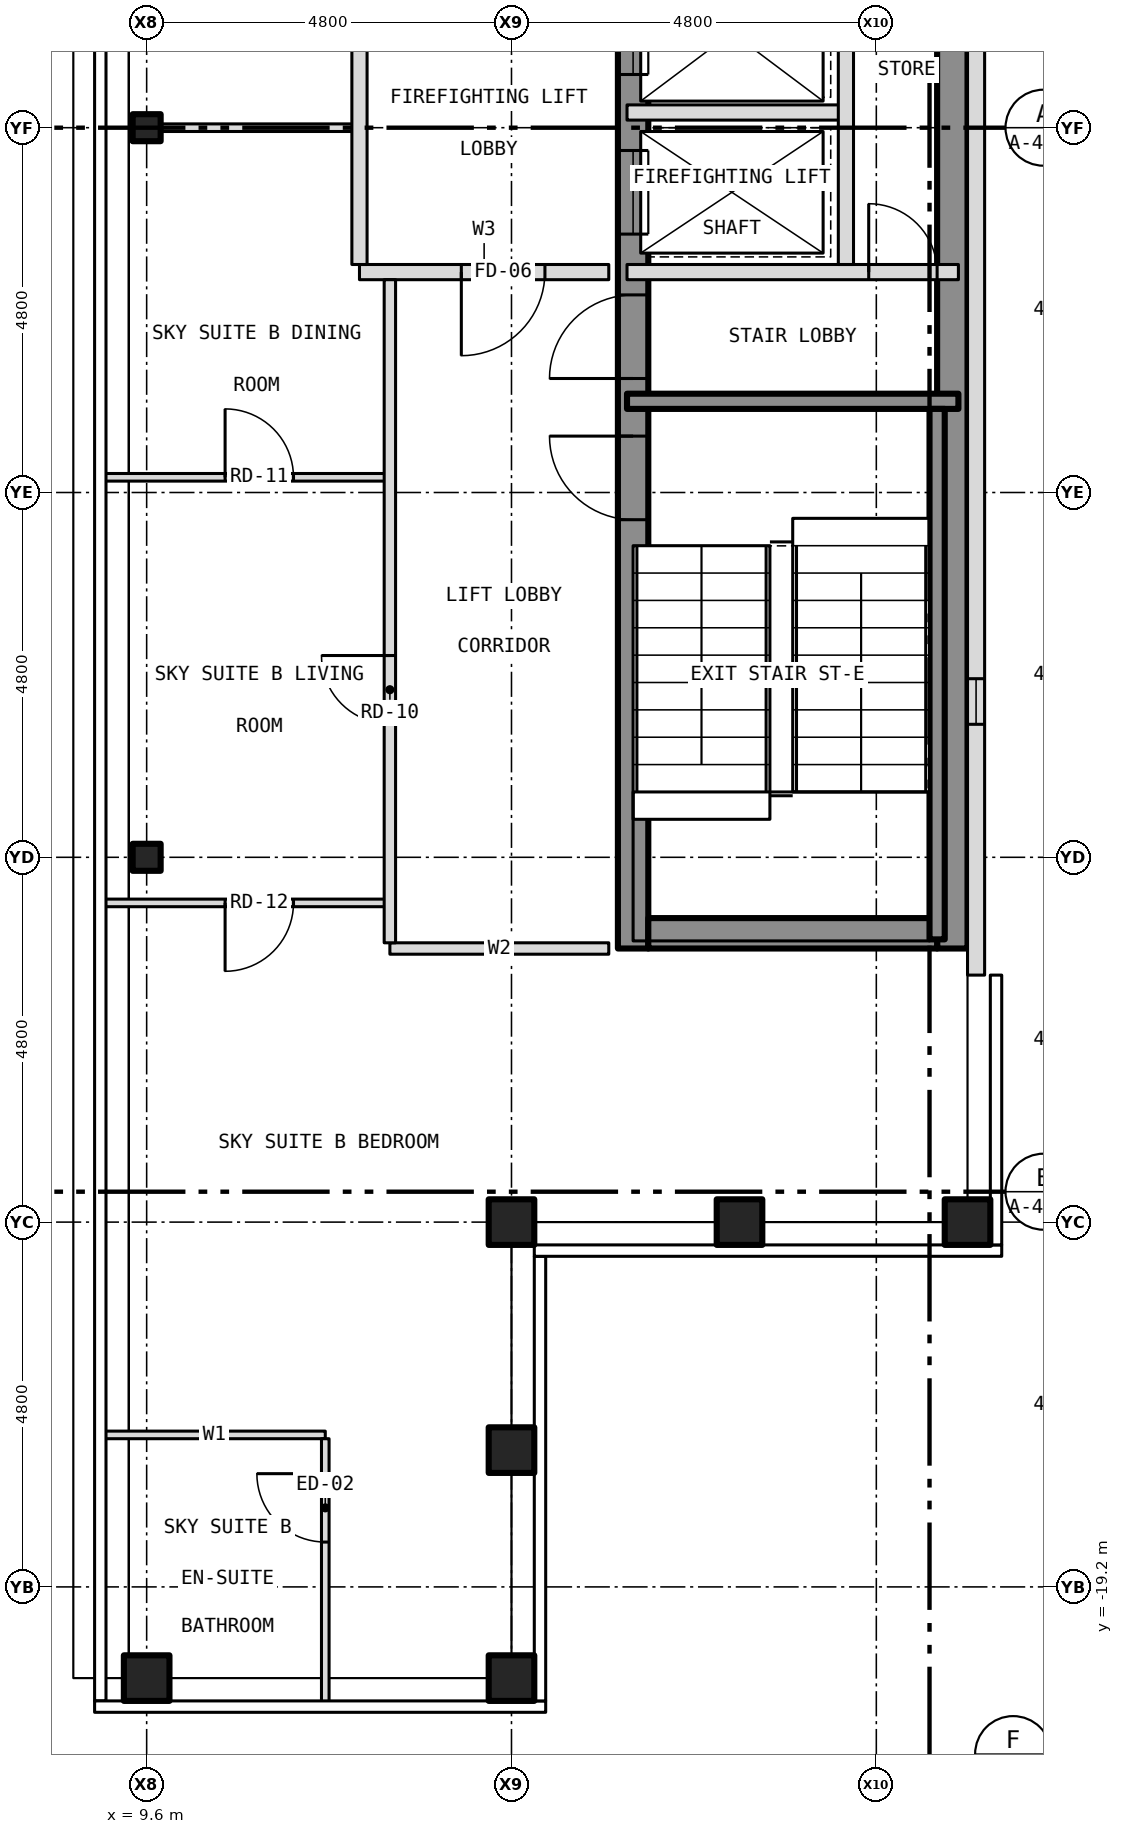
"""IFC4 building model, lengths in metres.
Left out: names, types, materials, properties, quantities, classifications, styles, units other than length and angle.
Written with IfcOpenShell. Run it as: python <this file> out.ifc"""

import sys

from ifc_helpers import new_model, si_unit, direction, frame, frame_2d, origin, origin_2d, place, context, subcontext, project, spatial, rectangle, hollow_rectangle, i_section, extrude, element, fill, save


model = new_model("IFC4")
c1 = context("Model", 3, precision=1e-05, world=origin(), true_north=direction((0.0, 1.0)))
c2 = subcontext(c1, "Body", "Model", "MODEL_VIEW")
j1 = project(units=[si_unit("LENGTHUNIT", "METRE"), si_unit("PLANEANGLEUNIT", "RADIAN")], contexts=[c1])
p1 = place(None, origin())
s1 = spatial("IfcSite", under=j1, at=p1, CompositionType="ELEMENT")
p2 = place(p1, origin())
s2 = spatial("IfcBuilding", under=s1, at=p2, CompositionType="ELEMENT")
p3 = place(p2, frame((0.0, 0.0, 276.0)))
s3 = spatial("IfcBuildingStorey", under=s2, at=p3, CompositionType="ELEMENT", Elevation=276.0)
for number, where, z_axis, x_axis in (
    (1, (9.6, -20.4, -0.15), (0.0, 0.0, 1.0), (1.0, 0.0, 0.0)),
    (2, (14.4, -20.4, -0.15), (0.0, 0.0, 1.0), (1.0, 0.0, 0.0)),
    (3, (20.4, -14.4, -0.15), (0.0, 0.0, 1.0), (1.0, 0.0, 0.0)),
    (4, (14.4, -14.4, -0.15), (0.0, 0.0, 1.0), (1.0, 0.0, 0.0)),
    (5, (14.4, -17.4, -0.15), (0.0, 0.0, 1.0), (1.0, 0.0, 0.0)),
    (6, (17.4, -14.4, -0.15), (0.0, 0.0, 1.0), (1.0, 0.0, 0.0)),
):
    element("IfcColumn", number, at=place(p3, frame(where, z_axis=z_axis, x_axis=x_axis)), inside=s3, PredefinedType="COLUMN", context=c2, shape_type="SweptSolid", body=[
        extrude(hollow_rectangle(XDim=0.6, YDim=0.6, WallThickness=0.03, at=origin_2d()), origin(), (0.0, 0.0, 1.0), 3.5),
    ])
for number, where, z_axis, x_axis in (
    (7, (9.6, -9.6, -0.15), (0.0, 0.0, 1.0), (1.0, 0.0, 0.0)),
    (8, (9.6, 0.0, -0.15), (0.0, 0.0, 1.0), (1.0, 0.0, 0.0)),
):
    element("IfcColumn", number, at=place(p3, frame(where, z_axis=z_axis, x_axis=x_axis)), inside=s3, PredefinedType="COLUMN", context=c2, shape_type="SweptSolid", body=[
        extrude(i_section(OverallWidth=0.368, OverallDepth=0.356, WebThickness=0.011, FlangeThickness=0.018, at=origin_2d()), origin(), (0.0, 0.0, 1.0), 3.5),
    ])
p4 = place(p3, frame((16.0, -10.8, 0.0), z_axis=(0.0, 0.0, 1.0), x_axis=(0.0, 1.0, 0.0)))
e9 = element("IfcWall", 9, at=p4, inside=s3, PredefinedType="SHEAR", context=c2, shape_type="SweptSolid", body=[
    extrude(rectangle(XDim=21.6, YDim=0.4, at=frame_2d((10.8, 0.0))), origin(), (0.0, 0.0, 1.0), 3.25),
])
p5 = place(p4, frame((9.4, 0.0, 0.0)))
e10 = element("IfcOpeningElement", 10, at=p5, cuts=e9, PredefinedType="OPENING", context=c2, shape_type="SweptSolid", body=[
    extrude(rectangle(XDim=1.1, YDim=2.1, at=frame_2d((0.55, 1.05))), frame((0.0, 0.212, 0.0), z_axis=(0.0, -1.0, 0.0), x_axis=(1.0, 0.0, 0.0)), (0.0, 0.0, 1.0), 0.424),
])
p6 = place(p4, frame((11.5, 0.0, 0.0)))
e11 = element("IfcOpeningElement", 11, at=p6, cuts=e9, PredefinedType="OPENING", context=c2, shape_type="SweptSolid", body=[
    extrude(rectangle(XDim=1.1, YDim=2.1, at=frame_2d((0.55, 1.05))), frame((0.0, 0.212, 0.0), z_axis=(0.0, -1.0, 0.0), x_axis=(1.0, 0.0, 0.0)), (0.0, 0.0, 1.0), 0.424),
])
p7 = place(p4, frame((13.6, 0.0, 0.0)))
e12 = element("IfcOpeningElement", 12, at=p7, cuts=e9, PredefinedType="OPENING", context=c2, shape_type="SweptSolid", body=[
    extrude(rectangle(XDim=1.1, YDim=2.1, at=frame_2d((0.55, 1.05))), frame((0.0, 0.212, 0.0), z_axis=(0.0, -1.0, 0.0), x_axis=(1.0, 0.0, 0.0)), (0.0, 0.0, 1.0), 0.424),
])
p8 = place(p4, frame((15.7, 0.0, 0.0)))
e13 = element("IfcOpeningElement", 13, at=p8, cuts=e9, PredefinedType="OPENING", context=c2, shape_type="SweptSolid", body=[
    extrude(rectangle(XDim=1.1, YDim=2.1, at=frame_2d((0.55, 1.05))), frame((0.0, 0.212, 0.0), z_axis=(0.0, -1.0, 0.0), x_axis=(1.0, 0.0, 0.0)), (0.0, 0.0, 1.0), 0.424),
])
p9 = place(p4, frame((17.8, 0.0, 0.0)))
e14 = element("IfcOpeningElement", 14, at=p9, cuts=e9, PredefinedType="OPENING", context=c2, shape_type="SweptSolid", body=[
    extrude(rectangle(XDim=1.1, YDim=2.1, at=frame_2d((0.55, 1.05))), frame((0.0, 0.212, 0.0), z_axis=(0.0, -1.0, 0.0), x_axis=(1.0, 0.0, 0.0)), (0.0, 0.0, 1.0), 0.424),
])
p10 = place(p4, frame((5.642, 0.0, 0.0)))
e15 = element("IfcOpeningElement", 15, at=p10, cuts=e9, PredefinedType="OPENING", context=c2, shape_type="SweptSolid", body=[
    extrude(rectangle(XDim=1.1, YDim=2.1, at=frame_2d((0.55, 1.05))), frame((0.0, 0.212, 0.0), z_axis=(0.0, -1.0, 0.0), x_axis=(1.0, 0.0, 0.0)), (0.0, 0.0, 1.0), 0.424),
])
p11 = place(p4, frame((7.5, 0.0, 0.0)))
e16 = element("IfcOpeningElement", 16, at=p11, cuts=e9, PredefinedType="OPENING", context=c2, shape_type="SweptSolid", body=[
    extrude(rectangle(XDim=1.1, YDim=2.1, at=frame_2d((0.55, 1.05))), frame((0.0, 0.212, 0.0), z_axis=(0.0, -1.0, 0.0), x_axis=(1.0, 0.0, 0.0)), (0.0, 0.0, 1.0), 0.424),
])
p12 = place(p4, frame((20.0, 0.0, 0.0)))
e17 = element("IfcOpeningElement", 17, at=p12, cuts=e9, PredefinedType="OPENING", context=c2, shape_type="SweptSolid", body=[
    extrude(rectangle(XDim=0.9, YDim=2.1, at=frame_2d((0.45, 1.05))), frame((0.0, 0.212, 0.0), z_axis=(0.0, -1.0, 0.0), x_axis=(1.0, 0.0, 0.0)), (0.0, 0.0, 1.0), 0.424),
])
p13 = place(p3, frame((20.2, -10.8, 0.0), z_axis=(0.0, 0.0, 1.0), x_axis=(0.0, 1.0, 0.0)))
e18 = element("IfcWall", 18, at=p13, inside=s3, PredefinedType="SHEAR", context=c2, shape_type="SweptSolid", body=[
    extrude(rectangle(XDim=21.6, YDim=0.4, at=frame_2d((10.8, 0.0))), origin(), (0.0, 0.0, 1.0), 3.25),
])
p14 = place(p3, frame((16.2, -10.6, 0.0), z_axis=(0.0, 0.0, 1.0), x_axis=(1.0, 0.0, 0.0)))
e19 = element("IfcWall", 19, at=p14, inside=s3, PredefinedType="SHEAR", context=c2, shape_type="SweptSolid", body=[
    extrude(rectangle(XDim=3.8, YDim=0.4, at=frame_2d((1.9, 0.0))), origin(), (0.0, 0.0, 1.0), 3.25),
])
p15 = place(p3, frame((20.512, -11.15, 0.0), z_axis=(0.0, 0.0, 1.0), x_axis=(0.0, 1.0, 0.0)))
e20 = element("IfcWall", 20, at=p15, inside=s3, PredefinedType="SOLIDWALL", context=c2, shape_type="SweptSolid", body=[
    extrude(rectangle(XDim=22.3, YDim=0.225, at=frame_2d((11.15, 0.0))), origin(), (0.0, 0.0, 1.0), 3.5),
])
p16 = place(p15, frame((3.3, 0.0, 1.0)))
e21 = element("IfcOpeningElement", 21, at=p16, cuts=e20, PredefinedType="OPENING", context=c2, shape_type="SweptSolid", body=[
    extrude(rectangle(XDim=0.6, YDim=1.5, at=frame_2d((0.3, 0.75))), frame((0.0, 0.125, 0.0), z_axis=(0.0, -1.0, 0.0), x_axis=(1.0, 0.0, 0.0)), (0.0, 0.0, 1.0), 0.249),
])
p17 = place(p3, frame((9.035, -17.2, 0.0), z_axis=(0.0, 0.0, 1.0), x_axis=(1.0, 0.0, 0.0)))
e22 = element("IfcWall", 22, at=p17, inside=s3, PredefinedType="PARTITIONING", context=c2, shape_type="SweptSolid", body=[
    extrude(rectangle(XDim=2.915, YDim=0.1, at=frame_2d((1.458, 0.0))), origin(), (0.0, 0.0, 1.0), 3.35),
])
p18 = place(p3, frame((12.8, -10.8, 0.0), z_axis=(0.0, 0.0, 1.0), x_axis=(1.0, 0.0, 0.0)))
e23 = element("IfcWall", 23, at=p18, inside=s3, PredefinedType="PARTITIONING", context=c2, shape_type="SweptSolid", body=[
    extrude(rectangle(XDim=2.88, YDim=0.15, at=frame_2d((1.44, 0.0))), origin(), (0.0, 0.0, 1.0), 3.35),
])
p19 = place(p3, frame((9.035, -10.2, 0.0), z_axis=(0.0, 0.0, 1.0), x_axis=(1.0, 0.0, 0.0)))
e24 = element("IfcWall", 24, at=p19, inside=s3, PredefinedType="PARTITIONING", context=c2, shape_type="SweptSolid", body=[
    extrude(rectangle(XDim=3.765, YDim=0.1, at=frame_2d((1.883, 0.0))), origin(), (0.0, 0.0, 1.0), 3.35),
])
p20 = place(p19, frame((1.597, 0.0, 0.0)))
e25 = element("IfcOpeningElement", 25, at=p20, cuts=e24, PredefinedType="OPENING", context=c2, shape_type="SweptSolid", body=[
    extrude(rectangle(XDim=0.9, YDim=2.1, at=frame_2d((0.45, 1.05))), frame((0.0, 0.062, 0.0), z_axis=(0.0, -1.0, 0.0), x_axis=(1.0, 0.0, 0.0)), (0.0, 0.0, 1.0), 0.124),
])
p21 = place(p3, frame((9.035, -4.6, 0.0), z_axis=(0.0, 0.0, 1.0), x_axis=(1.0, 0.0, 0.0)))
e26 = element("IfcWall", 26, at=p21, inside=s3, PredefinedType="PARTITIONING", context=c2, shape_type="SweptSolid", body=[
    extrude(rectangle(XDim=3.765, YDim=0.1, at=frame_2d((1.883, 0.0))), origin(), (0.0, 0.0, 1.0), 3.35),
])
p22 = place(p21, frame((1.597, 0.0, 0.0)))
e27 = element("IfcOpeningElement", 27, at=p22, cuts=e26, PredefinedType="OPENING", context=c2, shape_type="SweptSolid", body=[
    extrude(rectangle(XDim=0.9, YDim=2.1, at=frame_2d((0.45, 1.05))), frame((0.0, 0.062, 0.0), z_axis=(0.0, -1.0, 0.0), x_axis=(1.0, 0.0, 0.0)), (0.0, 0.0, 1.0), 0.124),
])
p23 = place(p3, frame((15.92, -3.6, 0.0), z_axis=(0.0, 0.0, 1.0), x_axis=(1.0, 0.0, 0.0)))
e28 = element("IfcWall", 28, at=p23, inside=s3, PredefinedType="SHEAR", context=c2, shape_type="SweptSolid", body=[
    extrude(rectangle(XDim=4.36, YDim=0.2, at=frame_2d((2.18, 0.0))), origin(), (0.0, 0.0, 1.0), 3.25),
])
p24 = place(p3, frame((12.4, -1.9, 0.0), z_axis=(0.0, 0.0, 1.0), x_axis=(1.0, 0.0, 0.0)))
e29 = element("IfcWall", 29, at=p24, inside=s3, PredefinedType="PARTITIONING", context=c2, shape_type="SweptSolid", body=[
    extrude(rectangle(XDim=3.28, YDim=0.2, at=frame_2d((1.64, 0.0))), origin(), (0.0, 0.0, 1.0), 3.35),
])
p25 = place(p24, frame((1.34, 0.0, 0.0)))
e30 = element("IfcOpeningElement", 30, at=p25, cuts=e29, PredefinedType="OPENING", context=c2, shape_type="SweptSolid", body=[
    extrude(rectangle(XDim=1.1, YDim=2.1, at=frame_2d((0.55, 1.05))), frame((0.0, 0.112, 0.0), z_axis=(0.0, -1.0, 0.0), x_axis=(1.0, 0.0, 0.0)), (0.0, 0.0, 1.0), 0.224),
])
p26 = place(p3, frame((15.92, -1.9, 0.0), z_axis=(0.0, 0.0, 1.0), x_axis=(1.0, 0.0, 0.0)))
e31 = element("IfcWall", 31, at=p26, inside=s3, PredefinedType="PARTITIONING", context=c2, shape_type="SweptSolid", body=[
    extrude(rectangle(XDim=4.36, YDim=0.2, at=frame_2d((2.18, 0.0))), origin(), (0.0, 0.0, 1.0), 3.25),
])
p27 = place(p26, frame((3.18, 0.0, 0.0)))
e32 = element("IfcOpeningElement", 32, at=p27, cuts=e31, PredefinedType="OPENING", context=c2, shape_type="SweptSolid", body=[
    extrude(rectangle(XDim=0.9, YDim=2.1, at=frame_2d((0.45, 1.05))), frame((0.0, 0.112, 0.0), z_axis=(0.0, -1.0, 0.0), x_axis=(1.0, 0.0, 0.0)), (0.0, 0.0, 1.0), 0.224),
])
p28 = place(p3, frame((9.485, 0.0, 0.0), z_axis=(0.0, 0.0, 1.0), x_axis=(1.0, 0.0, 0.0)))
e33 = element("IfcWall", 33, at=p28, inside=s3, PredefinedType="PARTITIONING", context=c2, shape_type="SweptSolid", body=[
    extrude(rectangle(XDim=2.915, YDim=0.1, at=frame_2d((1.458, 0.0))), origin(), (0.0, 0.0, 1.0), 2.728),
])
p29 = place(p3, frame((15.92, 0.2, 0.0), z_axis=(0.0, 0.0, 1.0), x_axis=(1.0, 0.0, 0.0)))
e34 = element("IfcWall", 34, at=p29, inside=s3, PredefinedType="PARTITIONING", context=c2, shape_type="SweptSolid", body=[
    extrude(rectangle(XDim=2.88, YDim=0.2, at=frame_2d((1.44, 0.0))), origin(), (0.0, 0.0, 1.0), 3.25),
])
p30 = place(p3, frame((11.95, -20.73, 0.0), z_axis=(0.0, 0.0, 1.0), x_axis=(0.0, 1.0, 0.0)))
e35 = element("IfcWall", 35, at=p30, inside=s3, PredefinedType="PARTITIONING", context=c2, shape_type="SweptSolid", body=[
    extrude(rectangle(XDim=3.48, YDim=0.1, at=frame_2d((1.74, 0.0))), origin(), (0.0, 0.0, 1.0), 3.35),
])
p31 = place(p30, frame((2.12, 0.0, 0.0)))
e36 = element("IfcOpeningElement", 36, at=p31, cuts=e35, PredefinedType="OPENING", context=c2, shape_type="SweptSolid", body=[
    extrude(rectangle(XDim=0.9, YDim=2.1, at=frame_2d((0.45, 1.05))), frame((0.0, 0.062, 0.0), z_axis=(0.0, -1.0, 0.0), x_axis=(1.0, 0.0, 0.0)), (0.0, 0.0, 1.0), 0.124),
])
p32 = place(p3, frame((12.4, -1.8, 0.0), z_axis=(0.0, 0.0, 1.0), x_axis=(0.0, 1.0, 0.0)))
e37 = element("IfcWall", 37, at=p32, inside=s3, PredefinedType="PARTITIONING", context=c2, shape_type="SweptSolid", body=[
    extrude(rectangle(XDim=4.0, YDim=0.2, at=frame_2d((2.0, 0.0))), origin(), (0.0, 0.0, 1.0), 3.35),
])
p33 = place(p3, frame((12.8, -10.725, 0.0), z_axis=(0.0, 0.0, 1.0), x_axis=(0.0, 1.0, 0.0)))
e38 = element("IfcWall", 38, at=p33, inside=s3, PredefinedType="PARTITIONING", context=c2, shape_type="SweptSolid", body=[
    extrude(rectangle(XDim=8.725, YDim=0.15, at=frame_2d((4.363, 0.0))), origin(), (0.0, 0.0, 1.0), 3.35),
])
p34 = place(p33, frame((2.88, 0.0, 0.0)))
e39 = element("IfcOpeningElement", 39, at=p34, cuts=e38, PredefinedType="OPENING", context=c2, shape_type="SweptSolid", body=[
    extrude(rectangle(XDim=0.9, YDim=2.1, at=frame_2d((0.45, 1.05))), frame((0.0, 0.087, 0.0), z_axis=(0.0, -1.0, 0.0), x_axis=(1.0, 0.0, 0.0)), (0.0, 0.0, 1.0), 0.174),
])
p35 = place(p3, frame((18.8, -1.8, 0.0), z_axis=(0.0, 0.0, 1.0), x_axis=(0.0, 1.0, 0.0)))
e40 = element("IfcWall", 40, at=p35, inside=s3, PredefinedType="PARTITIONING", context=c2, shape_type="SweptSolid", body=[
    extrude(rectangle(XDim=6.1, YDim=0.2, at=frame_2d((3.05, 0.0))), origin(), (0.0, 0.0, 1.0), 3.25),
])
p36 = place(p3, frame((20.0, -10.68, 0.0), z_axis=(0.0, 0.0, 1.0), x_axis=(0.0, 1.0, 0.0)))
e41 = element("IfcWall", 41, at=p36, inside=s3, PredefinedType="SHEAR", context=c2, shape_type="SweptSolid", body=[
    extrude(rectangle(XDim=6.98, YDim=0.2, at=frame_2d((3.49, 0.0))), origin(), (0.0, 0.0, 1.0), 3.25),
])
p37 = place(p16, origin())
e42 = element("IfcWindow", 42, at=p37, inside=s3, PartitioningType="SINGLE_PANEL", PredefinedType="WINDOW", context=c2, shape_type="SweptSolid", body=[
    extrude(rectangle(XDim=0.6, YDim=1.5, at=frame_2d((0.3, 0.75))), frame((0.0, -0.022, 0.0), z_axis=(0.0, -1.0, 0.0), x_axis=(1.0, 0.0, 0.0)), (0.0, 0.0, 1.0), 0.06),
])
fill(e21, e42)
p38 = place(p5, origin())
e43 = element("IfcDoor", 43, at=p38, inside=s3, OperationType="SLIDING_TO_LEFT", PredefinedType="DOOR", context=c2, shape_type="SweptSolid", body=[
    extrude(rectangle(XDim=1.1, YDim=2.1, at=frame_2d((0.55, 1.05))), frame((0.0, 0.025, 0.0), z_axis=(0.0, -1.0, 0.0), x_axis=(1.0, 0.0, 0.0)), (0.0, 0.0, 1.0), 0.05),
])
fill(e10, e43)
p39 = place(p6, origin())
e44 = element("IfcDoor", 44, at=p39, inside=s3, OperationType="SLIDING_TO_LEFT", PredefinedType="DOOR", context=c2, shape_type="SweptSolid", body=[
    extrude(rectangle(XDim=1.1, YDim=2.1, at=frame_2d((0.55, 1.05))), frame((0.0, 0.025, 0.0), z_axis=(0.0, -1.0, 0.0), x_axis=(1.0, 0.0, 0.0)), (0.0, 0.0, 1.0), 0.05),
])
fill(e11, e44)
p40 = place(p10, origin())
e45 = element("IfcDoor", 45, at=p40, inside=s3, OperationType="SINGLE_SWING_RIGHT", PredefinedType="DOOR", context=c2, shape_type="SweptSolid", body=[
    extrude(rectangle(XDim=1.1, YDim=2.1, at=frame_2d((0.55, 1.05))), frame((0.0, 0.025, 0.0), z_axis=(0.0, -1.0, 0.0), x_axis=(1.0, 0.0, 0.0)), (0.0, 0.0, 1.0), 0.05),
])
fill(e15, e45)
p41 = place(p11, origin())
e46 = element("IfcDoor", 46, at=p41, inside=s3, OperationType="SINGLE_SWING_LEFT", PredefinedType="DOOR", context=c2, shape_type="SweptSolid", body=[
    extrude(rectangle(XDim=1.1, YDim=2.1, at=frame_2d((0.55, 1.05))), frame((0.0, 0.025, 0.0), z_axis=(0.0, -1.0, 0.0), x_axis=(1.0, 0.0, 0.0)), (0.0, 0.0, 1.0), 0.05),
])
fill(e16, e46)
p42 = place(p27, origin())
e47 = element("IfcDoor", 47, at=p42, inside=s3, OperationType="SINGLE_SWING_LEFT", PredefinedType="DOOR", context=c2, shape_type="SweptSolid", body=[
    extrude(rectangle(XDim=0.9, YDim=2.1, at=frame_2d((0.45, 1.05))), frame((0.0, 0.025, 0.0), z_axis=(0.0, -1.0, 0.0), x_axis=(1.0, 0.0, 0.0)), (0.0, 0.0, 1.0), 0.05),
])
fill(e32, e47)
p43 = place(p25, origin())
e48 = element("IfcDoor", 48, at=p43, inside=s3, OperationType="SINGLE_SWING_LEFT", PredefinedType="DOOR", context=c2, shape_type="SweptSolid", body=[
    extrude(rectangle(XDim=1.1, YDim=2.1, at=frame_2d((0.55, 1.05))), frame((0.0, 0.025, 0.0), z_axis=(0.0, -1.0, 0.0), x_axis=(1.0, 0.0, 0.0)), (0.0, 0.0, 1.0), 0.05),
])
fill(e30, e48)
p44 = place(p34, origin())
e49 = element("IfcDoor", 49, at=p44, inside=s3, OperationType="SINGLE_SWING_RIGHT", PredefinedType="DOOR", context=c2, shape_type="SweptSolid", body=[
    extrude(rectangle(XDim=0.9, YDim=2.1, at=frame_2d((0.45, 1.05))), frame((0.0, 0.025, 0.0), z_axis=(0.0, -1.0, 0.0), x_axis=(1.0, 0.0, 0.0)), (0.0, 0.0, 1.0), 0.05),
])
fill(e39, e49)
p45 = place(p22, origin())
e50 = element("IfcDoor", 50, at=p45, inside=s3, OperationType="SINGLE_SWING_LEFT", PredefinedType="DOOR", context=c2, shape_type="SweptSolid", body=[
    extrude(rectangle(XDim=0.9, YDim=2.1, at=frame_2d((0.45, 1.05))), frame((0.0, 0.025, 0.0), z_axis=(0.0, -1.0, 0.0), x_axis=(1.0, 0.0, 0.0)), (0.0, 0.0, 1.0), 0.05),
])
fill(e27, e50)
p46 = place(p20, origin())
e51 = element("IfcDoor", 51, at=p46, inside=s3, OperationType="SINGLE_SWING_LEFT", PredefinedType="DOOR", context=c2, shape_type="SweptSolid", body=[
    extrude(rectangle(XDim=0.9, YDim=2.1, at=frame_2d((0.45, 1.05))), frame((0.0, 0.025, 0.0), z_axis=(0.0, -1.0, 0.0), x_axis=(1.0, 0.0, 0.0)), (0.0, 0.0, 1.0), 0.05),
])
fill(e25, e51)
p47 = place(p31, origin())
e52 = element("IfcDoor", 52, at=p47, inside=s3, OperationType="SINGLE_SWING_RIGHT", PredefinedType="DOOR", context=c2, shape_type="SweptSolid", body=[
    extrude(rectangle(XDim=0.9, YDim=2.1, at=frame_2d((0.45, 1.05))), frame((0.0, 0.025, 0.0), z_axis=(0.0, -1.0, 0.0), x_axis=(1.0, 0.0, 0.0)), (0.0, 0.0, 1.0), 0.05),
])
fill(e36, e52)
save(model, sys.argv[1])
